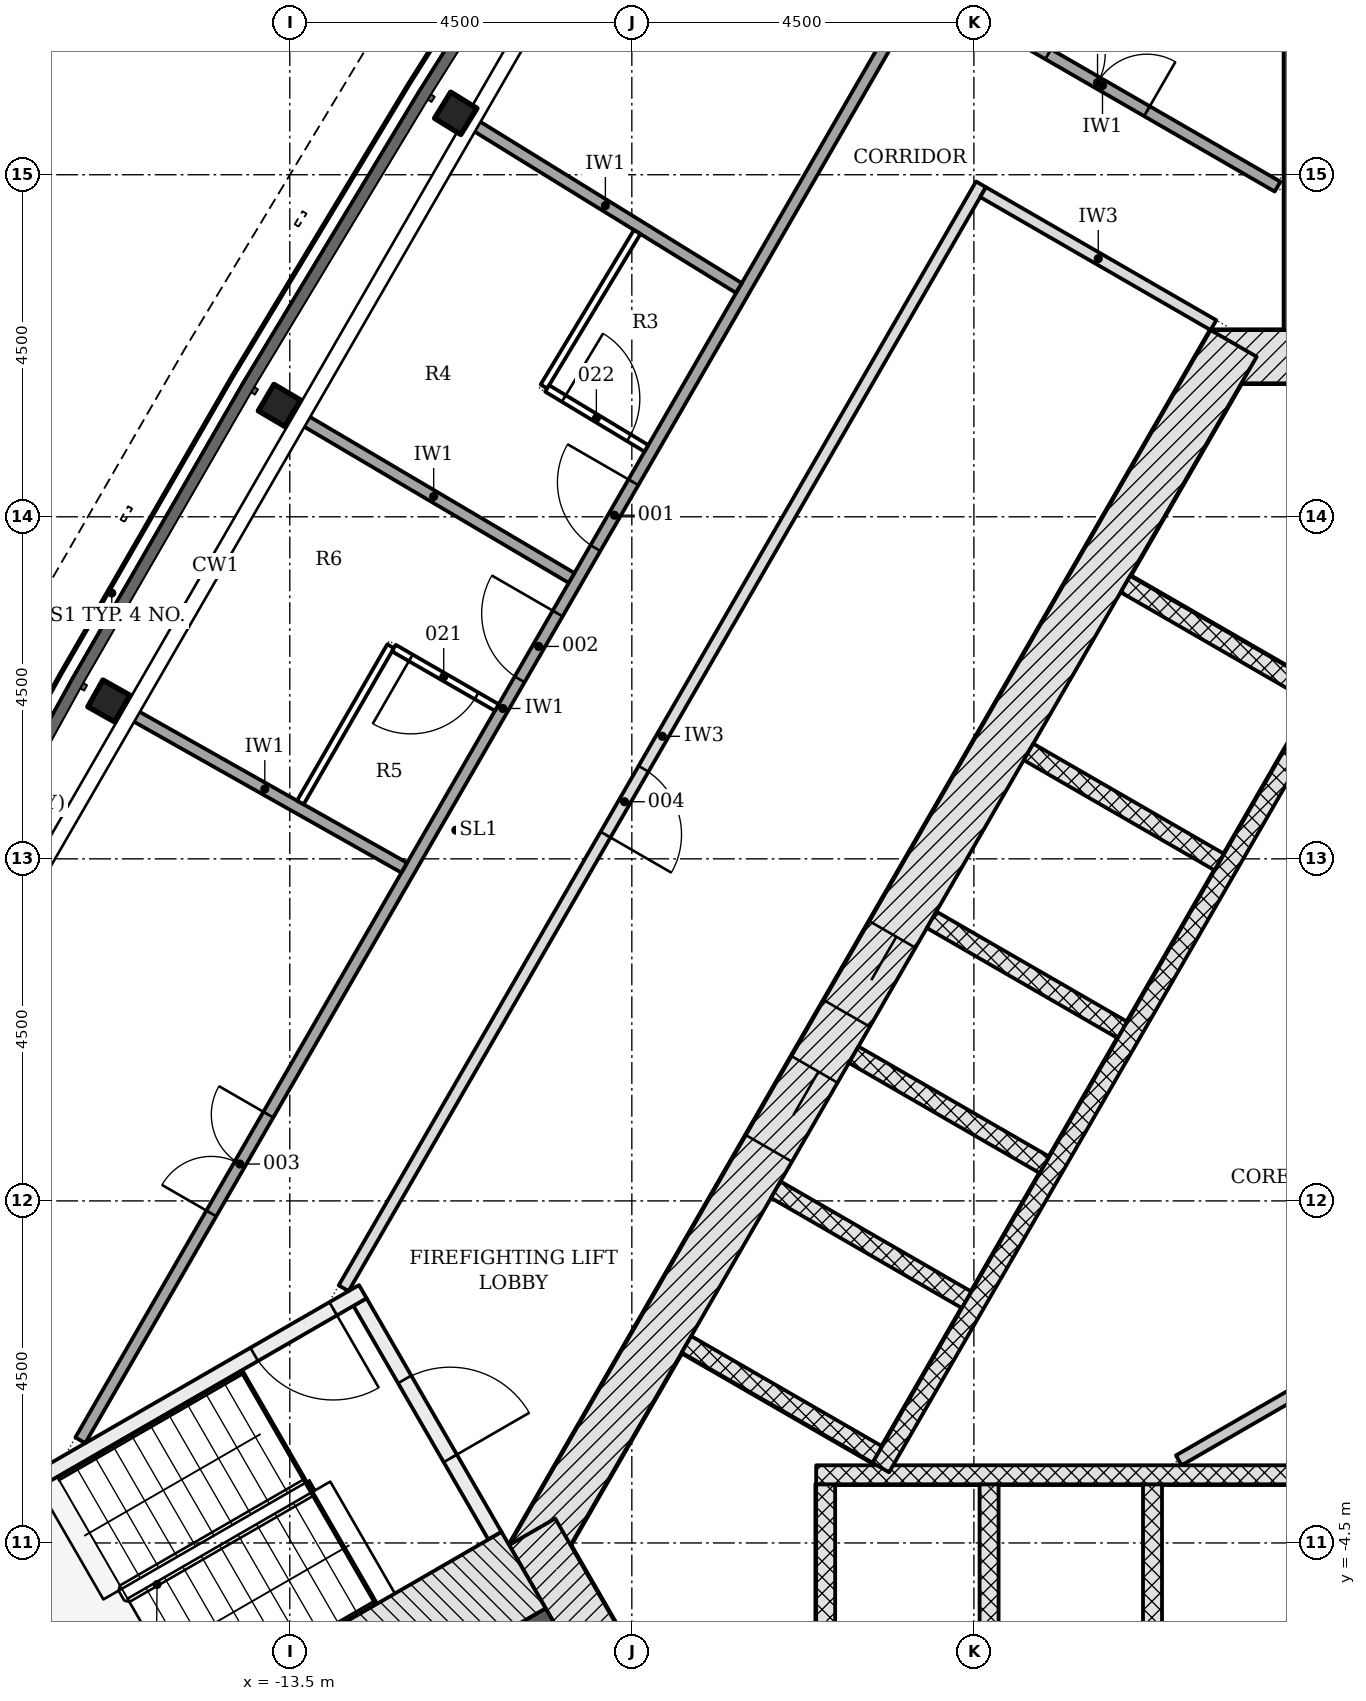
"""IFC4 building model, lengths in metres.
Left out: names, types, materials, properties, quantities, classifications, styles, units other than length and angle.
Written with IfcOpenShell. Run it as: python <this file> out.ifc"""

import sys

from ifc_helpers import new_model, si_unit, direction, frame, frame_2d, origin, origin_2d, place, context, subcontext, project, spatial, rectangle, i_section, extrude, element, fill, save


model = new_model("IFC4")
c1 = context("Model", 3, precision=1e-05, world=origin(), true_north=direction((0.0, 1.0)))
c2 = subcontext(c1, "Body", "Model", "MODEL_VIEW")
j1 = project(units=[si_unit("LENGTHUNIT", "METRE"), si_unit("PLANEANGLEUNIT", "RADIAN")], contexts=[c1])
p1 = place(None, origin())
s1 = spatial("IfcSite", under=j1, at=p1, CompositionType="ELEMENT")
p2 = place(p1, origin())
s2 = spatial("IfcBuilding", under=s1, at=p2, CompositionType="ELEMENT")
p3 = place(p2, frame((0.0, 0.0, 79.8)))
s3 = spatial("IfcBuildingStorey", under=s2, at=p3, CompositionType="ELEMENT", Elevation=79.8)
p4 = place(p3, frame((1.386, 11.106, -0.2), z_axis=(0.0, 0.0, 1.0), x_axis=(-1.0, 0.0, 0.0)))
e1 = element("IfcWall", 1, at=p4, inside=s3, PredefinedType="SHEAR", context=c2, shape_type="SweptSolid", body=[
    extrude(rectangle(XDim=2.771, YDim=0.7, at=frame_2d((1.386, 0.0))), origin(), (0.0, 0.0, 1.0), 3.6),
])
p5 = place(p3, frame((-1.083, 11.281, -0.2), z_axis=(0.0, 0.0, 1.0), x_axis=(-0.500001446645, -0.866024568562, 0.0)))
e2 = element("IfcWall", 2, at=p5, inside=s3, PredefinedType="SHEAR", context=c2, shape_type="SweptSolid", body=[
    extrude(rectangle(XDim=18.458, YDim=0.7, at=frame_2d((9.229, 0.0))), origin(), (0.0, 0.0, 1.0), 3.6),
])
p6 = place(p5, frame((8.979, 0.0, 0.2)))
e3 = element("IfcOpeningElement", 3, at=p6, cuts=e2, PredefinedType="OPENING", context=c2, shape_type="SweptSolid", body=[
    extrude(rectangle(XDim=1.2, YDim=2.1, at=frame_2d((0.6, 1.05))), frame((0.0, 0.36, 0.0), z_axis=(0.0, -1.0, 0.0), x_axis=(1.0, 0.0, 0.0)), (0.0, 0.0, 1.0), 0.72),
])
p7 = place(p5, frame((11.029, 0.0, 0.2)))
e4 = element("IfcOpeningElement", 4, at=p7, cuts=e2, PredefinedType="OPENING", context=c2, shape_type="SweptSolid", body=[
    extrude(rectangle(XDim=1.2, YDim=2.1, at=frame_2d((0.6, 1.05))), frame((0.0, 0.36, 0.0), z_axis=(0.0, -1.0, 0.0), x_axis=(1.0, 0.0, 0.0)), (0.0, 0.0, 1.0), 0.72),
])
p8 = place(p3, frame((-10.311, -4.353, -0.2), z_axis=(0.0, 0.0, 1.0), x_axis=(0.500042739161, -0.866000726912, 0.0)))
e5 = element("IfcWall", 5, at=p8, inside=s3, PredefinedType="SHEAR", context=c2, shape_type="SweptSolid", body=[
    extrude(rectangle(XDim=2.771, YDim=0.7, at=frame_2d((1.386, 0.0))), origin(), (0.0, 0.0, 1.0), 3.6),
])
p9 = place(p3, frame((0.0, 11.456, -0.2), z_axis=(0.0, 0.0, 1.0), x_axis=(0.0, 1.0, 0.0)))
e6 = element("IfcWall", 6, at=p9, inside=s3, PredefinedType="SHEAR", context=c2, shape_type="SweptSolid", body=[
    extrude(rectangle(XDim=13.065, YDim=0.85, at=frame_2d((6.532, 0.0))), origin(), (0.0, 0.0, 1.0), 3.6),
])
p10 = place(p3, frame((-9.922, -5.728, -0.2), z_axis=(0.0, 0.0, 1.0), x_axis=(-0.866026565165, -0.499997988424, 0.0)))
e7 = element("IfcWall", 7, at=p10, inside=s3, PredefinedType="SHEAR", context=c2, shape_type="SweptSolid", body=[
    extrude(rectangle(XDim=13.064, YDim=0.85, at=frame_2d((6.532, 0.0))), origin(), (0.0, 0.0, 1.0), 3.6),
])
for number, where, z_axis, x_axis in (
    (8, (-11.316, 14.308, -0.2), (0.0, 0.0, 1.0), (-0.525, -0.851, 0.0)),
    (9, (-13.636, 10.465, -0.2), (0.0, 0.0, 1.0), (-0.508, -0.861, 0.0)),
    (10, (-15.881, 6.577, -0.2), (0.0, 0.0, 1.0), (-0.492, -0.871, 0.0)),
):
    element("IfcColumn", number, at=place(p3, frame(where, z_axis=z_axis, x_axis=x_axis)), inside=s3, PredefinedType="COLUMN", context=c2, shape_type="SweptSolid", body=[
        extrude(i_section(OverallWidth=0.404, OverallDepth=0.406, WebThickness=0.027, FlangeThickness=0.044, FilletRadius=0.015, at=origin_2d()), origin(), (0.0, 0.0, 1.0), 3.6),
    ])
for number, where, z_axis, x_axis in (
    (11, (-6.45, -6.228, -0.2), (0.0, 0.0, 1.0), (0.0, 1.0, 0.0)),
    (12, (-4.3, -6.228, -0.2), (0.0, 0.0, 1.0), (0.0, 1.0, 0.0)),
    (13, (-2.15, -6.228, -0.2), (0.0, 0.0, 1.0), (0.0, 1.0, 0.0)),
):
    element("IfcWall", number, at=place(p3, frame(where, z_axis=z_axis, x_axis=x_axis)), inside=s3, PredefinedType="PARTITIONING", context=c2, shape_type="SweptSolid", body=[
        extrude(rectangle(XDim=2.5, YDim=0.25, at=frame_2d((1.25, 0.0))), origin(), (0.0, 0.0, 1.0), 3.6),
    ])
p11 = place(p3, frame((-6.575, -3.603, 0.0), z_axis=(0.0, 0.0, 1.0), x_axis=(1.0, 0.0, 0.0)))
e14 = element("IfcWall", 14, at=p11, inside=s3, PredefinedType="PARTITIONING", context=c2, shape_type="SweptSolid", body=[
    extrude(rectangle(XDim=13.15, YDim=0.25, at=frame_2d((6.575, 0.0))), origin(), (0.0, 0.0, 1.0), 3.4),
])
p12 = place(p3, frame((-2.506, 8.115, -0.2), z_axis=(0.0, 0.0, 1.0), x_axis=(0.865996321171, -0.50005036918, 0.0)))
e15 = element("IfcWall", 15, at=p12, inside=s3, PredefinedType="PARTITIONING", context=c2, shape_type="SweptSolid", body=[
    extrude(rectangle(XDim=2.9, YDim=0.25, at=frame_2d((1.45, 0.0))), origin(), (0.0, 0.0, 1.0), 3.6),
])
for number, where, z_axis, x_axis in (
    (16, (-3.781, 5.907, -0.2), (0.0, 0.0, 1.0), (0.866, -0.5, 0.0)),
    (17, (-5.056, 3.699, -0.2), (0.0, 0.0, 1.0), (0.866, -0.5, 0.0)),
    (18, (-6.081, 1.923, -0.2), (0.0, 0.0, 1.0), (0.866, -0.5, 0.0)),
    (19, (-7.106, 0.148, -0.2), (0.0, 0.0, 1.0), (0.866, -0.5, 0.0)),
    (20, (-8.281, -1.887, -0.2), (0.0, 0.0, 1.0), (0.866, -0.5, 0.0)),
):
    element("IfcWall", number, at=place(p3, frame(where, z_axis=z_axis, x_axis=x_axis)), inside=s3, PredefinedType="PARTITIONING", context=c2, shape_type="SweptSolid", body=[
        extrude(rectangle(XDim=2.9, YDim=0.25, at=frame_2d((1.45, 0.0))), origin(), (0.0, 0.0, 1.0), 3.6),
    ])
p13 = place(p3, frame((0.176, 6.711, 0.0), z_axis=(0.0, 0.0, 1.0), x_axis=(-0.500004227369, -0.866022963098, 0.0)))
e21 = element("IfcWall", 21, at=p13, inside=s3, PredefinedType="PARTITIONING", context=c2, shape_type="SweptSolid", body=[
    extrude(rectangle(XDim=11.8, YDim=0.25, at=frame_2d((5.9, 0.0))), origin(), (0.0, 0.0, 1.0), 3.4),
])
p14 = place(p3, frame((-1.804, -3.413, 0.0), z_axis=(0.0, 0.0, 1.0), x_axis=(0.866035761792, 0.499982058975, 0.0)))
e22 = element("IfcWall", 22, at=p14, inside=s3, PredefinedType="PARTITIONING", context=c2, shape_type="SweptSolid", body=[
    extrude(rectangle(XDim=9.497, YDim=0.15, at=frame_2d((4.749, 0.0))), origin(), (0.0, 0.0, 1.0), 3.4),
])
p15 = place(p14, frame((2.85, 0.0, 0.0)))
e23 = element("IfcOpeningElement", 23, at=p15, cuts=e22, PredefinedType="OPENING", context=c2, shape_type="SweptSolid", body=[
    extrude(rectangle(XDim=0.9, YDim=2.1, at=frame_2d((0.45, 1.05))), frame((0.0, 0.085, 0.0), z_axis=(0.0, -1.0, 0.0), x_axis=(1.0, 0.0, 0.0)), (0.0, 0.0, 1.0), 0.17),
])
p16 = place(p3, frame((-12.576, -1.331, -0.2), z_axis=(0.0, 0.0, 1.0), x_axis=(0.499970499736, -0.8660424351, 0.0)))
e24 = element("IfcWall", 24, at=p16, inside=s3, PredefinedType="SHEAR", context=c2, shape_type="SweptSolid", body=[
    extrude(rectangle(XDim=3.55, YDim=0.2, at=frame_2d((1.775, 0.0))), origin(), (0.0, 0.0, 1.0), 3.6),
])
p17 = place(p16, frame((1.175, 0.0, 0.2)))
e25 = element("IfcOpeningElement", 25, at=p17, cuts=e24, PredefinedType="OPENING", context=c2, shape_type="SweptSolid", body=[
    extrude(rectangle(XDim=1.2, YDim=2.1, at=frame_2d((0.6, 1.05))), frame((0.0, 0.11, 0.0), z_axis=(0.0, -1.0, 0.0), x_axis=(1.0, 0.0, 0.0)), (0.0, 0.0, 1.0), 0.22),
])
p18 = place(p3, frame((-12.539, -1.194, -0.2), z_axis=(0.0, 0.0, 1.0), x_axis=(-0.866045472092, -0.499965239061, 0.0)))
e26 = element("IfcWall", 26, at=p18, inside=s3, PredefinedType="SHEAR", context=c2, shape_type="SweptSolid", body=[
    extrude(rectangle(XDim=5.6, YDim=0.2, at=frame_2d((2.8, 0.0))), origin(), (0.0, 0.0, 1.0), 3.6),
])
p19 = place(p18, frame((0.45, 0.0, 0.2)))
e27 = element("IfcOpeningElement", 27, at=p19, cuts=e26, PredefinedType="OPENING", context=c2, shape_type="SweptSolid", body=[
    extrude(rectangle(XDim=1.2, YDim=2.1, at=frame_2d((0.6, 1.05))), frame((0.0, 0.11, 0.0), z_axis=(0.0, -1.0, 0.0), x_axis=(1.0, 0.0, 0.0)), (0.0, 0.0, 1.0), 0.22),
])
p20 = place(p3, frame((-10.424, -4.858, -0.2), z_axis=(0.0, 0.0, 1.0), x_axis=(-0.866033125095, -0.499986626058, 0.0)))
e28 = element("IfcWall", 28, at=p20, inside=s3, PredefinedType="SHEAR", context=c2, shape_type="SweptSolid", body=[
    extrude(rectangle(XDim=7.2, YDim=1.161, at=frame_2d((3.6, 0.0))), origin(), (0.0, 0.0, 1.0), 3.6),
])
p21 = place(p3, frame((-16.256, -3.149, 0.0), z_axis=(0.0, 0.0, 1.0), x_axis=(0.499999683919, 0.866025586274, 0.0)))
e29 = element("IfcWall", 29, at=p21, inside=s3, PredefinedType="PARTITIONING", context=c2, shape_type="SweptSolid", body=[
    extrude(rectangle(XDim=22.234, YDim=0.15, at=frame_2d((11.117, 0.0))), origin(), (0.0, 0.0, 1.0), 2.778),
])
p22 = place(p21, frame((13.553, 0.0, 0.0)))
e30 = element("IfcOpeningElement", 30, at=p22, cuts=e29, PredefinedType="OPENING", context=c2, shape_type="SweptSolid", body=[
    extrude(rectangle(XDim=1.0, YDim=2.1, at=frame_2d((0.5, 1.05))), frame((0.0, 0.085, 0.0), z_axis=(0.0, -1.0, 0.0), x_axis=(1.0, 0.0, 0.0)), (0.0, 0.0, 1.0), 0.17),
])
p23 = place(p21, frame((11.56, 0.0, 0.0)))
e31 = element("IfcOpeningElement", 31, at=p23, cuts=e29, PredefinedType="OPENING", context=c2, shape_type="SweptSolid", body=[
    extrude(rectangle(XDim=1.0, YDim=2.1, at=frame_2d((0.5, 1.05))), frame((0.0, 0.085, 0.0), z_axis=(0.0, -1.0, 0.0), x_axis=(1.0, 0.0, 0.0)), (0.0, 0.0, 1.0), 0.17),
])
p24 = place(p21, frame((3.446, 0.0, 0.0)))
e32 = element("IfcOpeningElement", 32, at=p24, cuts=e29, PredefinedType="OPENING", context=c2, shape_type="SweptSolid", body=[
    extrude(rectangle(XDim=1.5, YDim=2.1, at=frame_2d((0.75, 1.05))), frame((0.0, 0.085, 0.0), z_axis=(0.0, -1.0, 0.0), x_axis=(1.0, 0.0, 0.0)), (0.0, 0.0, 1.0), 0.17),
])
p25 = place(p3, frame((-4.407, 13.374, 0.0), z_axis=(0.0, 0.0, 1.0), x_axis=(-0.499997181693, -0.866027030928, 0.0)))
e33 = element("IfcWall", 33, at=p25, inside=s3, PredefinedType="PARTITIONING", context=c2, shape_type="SweptSolid", body=[
    extrude(rectangle(XDim=16.77, YDim=0.15, at=frame_2d((8.385, 0.0))), origin(), (0.0, 0.0, 1.0), 2.778),
])
p26 = place(p25, frame((8.879, 0.0, 0.0)))
e34 = element("IfcOpeningElement", 34, at=p26, cuts=e33, PredefinedType="OPENING", context=c2, shape_type="SweptSolid", body=[
    extrude(rectangle(XDim=1.0, YDim=2.1, at=frame_2d((0.5, 1.05))), frame((0.0, 0.085, 0.0), z_axis=(0.0, -1.0, 0.0), x_axis=(1.0, 0.0, 0.0)), (0.0, 0.0, 1.0), 0.17),
])
p27 = place(p3, frame((-5.111, 16.003, 0.0), z_axis=(0.0, 0.0, 1.0), x_axis=(0.866034245675, -0.499984685083, 0.0)))
e35 = element("IfcWall", 35, at=p27, inside=s3, PredefinedType="PARTITIONING", context=c2, shape_type="SweptSolid", body=[
    extrude(rectangle(XDim=5.319, YDim=0.15, at=frame_2d((2.66, 0.0))), origin(), (0.0, 0.0, 1.0), 3.4),
])
p28 = place(p27, frame((1.834, 0.0, 0.0)))
e36 = element("IfcOpeningElement", 36, at=p28, cuts=e35, PredefinedType="OPENING", context=c2, shape_type="SweptSolid", body=[
    extrude(rectangle(XDim=1.5, YDim=2.1, at=frame_2d((0.75, 1.05))), frame((0.0, 0.085, 0.0), z_axis=(0.0, -1.0, 0.0), x_axis=(1.0, 0.0, 0.0)), (0.0, 0.0, 1.0), 0.17),
])
p29 = place(p3, frame((-4.379, 13.271, 0.0), z_axis=(0.0, 0.0, 1.0), x_axis=(0.866019471182, -0.500010275428, 0.0)))
e37 = element("IfcWall", 37, at=p29, inside=s3, PredefinedType="PARTITIONING", context=c2, shape_type="SweptSolid", body=[
    extrude(rectangle(XDim=3.5, YDim=0.15, at=frame_2d((1.75, 0.0))), origin(), (0.0, 0.0, 1.0), 3.4),
])
p30 = place(p3, frame((-15.663, 6.454, 0.0), z_axis=(0.0, 0.0, 1.0), x_axis=(0.870876717705, -0.491501518369, 0.0)))
e38 = element("IfcWall", 38, at=p30, inside=s3, PredefinedType="PARTITIONING", context=c2, shape_type="SweptSolid", body=[
    extrude(rectangle(XDim=4.213, YDim=0.15, at=frame_2d((2.106, 0.0))), origin(), (0.0, 0.0, 1.0), 2.778),
])
p31 = place(p3, frame((-13.421, 10.338, 0.0), z_axis=(0.0, 0.0, 1.0), x_axis=(0.861127198417, -0.508389563372, 0.0)))
e39 = element("IfcWall", 39, at=p31, inside=s3, PredefinedType="PARTITIONING", context=c2, shape_type="SweptSolid", body=[
    extrude(rectangle(XDim=4.213, YDim=0.15, at=frame_2d((2.106, 0.0))), origin(), (0.0, 0.0, 1.0), 2.778),
])
p32 = place(p3, frame((-11.104, 14.177, 0.0), z_axis=(0.0, 0.0, 1.0), x_axis=(0.851052327985, -0.525080884276, 0.0)))
e40 = element("IfcWall", 40, at=p32, inside=s3, PredefinedType="PARTITIONING", context=c2, shape_type="SweptSolid", body=[
    extrude(rectangle(XDim=4.126, YDim=0.15, at=frame_2d((2.063, 0.0))), origin(), (0.0, 0.0, 1.0), 2.778),
])
p33 = place(p3, frame((-8.93, 12.747, 0.0), z_axis=(0.0, 0.0, 1.0), x_axis=(-0.516762446906, -0.856128829948, 0.0)))
e41 = element("IfcWall", 41, at=p33, inside=s3, PredefinedType="PARTITIONING", context=c2, shape_type="SweptSolid", body=[
    extrude(rectangle(XDim=2.374, YDim=0.1, at=frame_2d((1.187, 0.0))), origin(), (0.0, 0.0, 1.0), 2.778),
])
p34 = place(p3, frame((-13.361, 5.241, 0.0), z_axis=(0.0, 0.0, 1.0), x_axis=(0.499965759324, 0.866045171745, 0.0)))
e42 = element("IfcWall", 42, at=p34, inside=s3, PredefinedType="PARTITIONING", context=c2, shape_type="SweptSolid", body=[
    extrude(rectangle(XDim=2.374, YDim=0.1, at=frame_2d((1.187, 0.0))), origin(), (0.0, 0.0, 1.0), 2.778),
])
p35 = place(p3, frame((-10.777, 6.491, 0.0), z_axis=(0.0, 0.0, 1.0), x_axis=(-0.865995788838, 0.500051291085, 0.0)))
e43 = element("IfcWall", 43, at=p35, inside=s3, PredefinedType="PARTITIONING", context=c2, shape_type="SweptSolid", body=[
    extrude(rectangle(XDim=1.564, YDim=0.1, at=frame_2d((0.782, 0.0))), origin(), (0.0, 0.0, 1.0), 3.4),
])
p36 = place(p35, frame((0.307, 0.0, 0.0)))
e44 = element("IfcOpeningElement", 44, at=p36, cuts=e43, PredefinedType="OPENING", context=c2, shape_type="SweptSolid", body=[
    extrude(rectangle(XDim=1.0, YDim=2.1, at=frame_2d((0.5, 1.05))), frame((0.0, 0.06, 0.0), z_axis=(0.0, -1.0, 0.0), x_axis=(1.0, 0.0, 0.0)), (0.0, 0.0, 1.0), 0.12),
])
p37 = place(p3, frame((-10.114, 10.688, 0.0), z_axis=(0.0, 0.0, 1.0), x_axis=(0.856147343639, -0.516731773728, 0.0)))
e45 = element("IfcWall", 45, at=p37, inside=s3, PredefinedType="PARTITIONING", context=c2, shape_type="SweptSolid", body=[
    extrude(rectangle(XDim=1.524, YDim=0.1, at=frame_2d((0.762, 0.0))), origin(), (0.0, 0.0, 1.0), 3.4),
])
p38 = place(p37, frame((0.256, 0.0, 0.0)))
e46 = element("IfcOpeningElement", 46, at=p38, cuts=e45, PredefinedType="OPENING", context=c2, shape_type="SweptSolid", body=[
    extrude(rectangle(XDim=1.0, YDim=2.1, at=frame_2d((0.5, 1.05))), frame((0.0, 0.06, 0.0), z_axis=(0.0, -1.0, 0.0), x_axis=(1.0, 0.0, 0.0)), (0.0, 0.0, 1.0), 0.12),
])
p39 = place(p6, origin())
e47 = element("IfcDoor", 47, at=p39, inside=s3, OperationType="DOUBLE_DOOR_SLIDING", PredefinedType="DOOR", context=c2, shape_type="SweptSolid", body=[
    extrude(rectangle(XDim=1.2, YDim=2.1, at=frame_2d((0.6, 1.05))), frame((0.0, 0.025, 0.0), z_axis=(0.0, -1.0, 0.0), x_axis=(1.0, 0.0, 0.0)), (0.0, 0.0, 1.0), 0.05),
])
fill(e3, e47)
p40 = place(p7, origin())
e48 = element("IfcDoor", 48, at=p40, inside=s3, OperationType="DOUBLE_DOOR_SLIDING", PredefinedType="DOOR", context=c2, shape_type="SweptSolid", body=[
    extrude(rectangle(XDim=1.2, YDim=2.1, at=frame_2d((0.6, 1.05))), frame((0.0, 0.025, 0.0), z_axis=(0.0, -1.0, 0.0), x_axis=(1.0, 0.0, 0.0)), (0.0, 0.0, 1.0), 0.05),
])
fill(e4, e48)
p41 = place(p17, origin())
e49 = element("IfcDoor", 49, at=p41, inside=s3, OperationType="SINGLE_SWING_RIGHT", PredefinedType="DOOR", context=c2, shape_type="SweptSolid", body=[
    extrude(rectangle(XDim=1.2, YDim=2.1, at=frame_2d((0.6, 1.05))), frame((0.0, 0.025, 0.0), z_axis=(0.0, -1.0, 0.0), x_axis=(1.0, 0.0, 0.0)), (0.0, 0.0, 1.0), 0.05),
])
fill(e25, e49)
p42 = place(p19, origin())
e50 = element("IfcDoor", 50, at=p42, inside=s3, OperationType="SINGLE_SWING_LEFT", PredefinedType="DOOR", context=c2, shape_type="SweptSolid", body=[
    extrude(rectangle(XDim=1.2, YDim=2.1, at=frame_2d((0.6, 1.05))), frame((0.0, 0.025, 0.0), z_axis=(0.0, -1.0, 0.0), x_axis=(1.0, 0.0, 0.0)), (0.0, 0.0, 1.0), 0.05),
])
fill(e27, e50)
p43 = place(p22, origin())
e51 = element("IfcDoor", 51, at=p43, inside=s3, OperationType="SINGLE_SWING_RIGHT", PredefinedType="DOOR", context=c2, shape_type="SweptSolid", body=[
    extrude(rectangle(XDim=1.0, YDim=2.1, at=frame_2d((0.5, 1.05))), frame((0.0, 0.025, 0.0), z_axis=(0.0, -1.0, 0.0), x_axis=(1.0, 0.0, 0.0)), (0.0, 0.0, 1.0), 0.05),
])
fill(e30, e51)
p44 = place(p23, origin())
e52 = element("IfcDoor", 52, at=p44, inside=s3, OperationType="SINGLE_SWING_RIGHT", PredefinedType="DOOR", context=c2, shape_type="SweptSolid", body=[
    extrude(rectangle(XDim=1.0, YDim=2.1, at=frame_2d((0.5, 1.05))), frame((0.0, 0.025, 0.0), z_axis=(0.0, -1.0, 0.0), x_axis=(1.0, 0.0, 0.0)), (0.0, 0.0, 1.0), 0.05),
])
fill(e31, e52)
p45 = place(p24, origin())
e53 = element("IfcDoor", 53, at=p45, inside=s3, OperationType="DOUBLE_DOOR_SINGLE_SWING", PredefinedType="DOOR", context=c2, shape_type="SweptSolid", body=[
    extrude(rectangle(XDim=1.5, YDim=2.1, at=frame_2d((0.75, 1.05))), frame((0.0, 0.025, 0.0), z_axis=(0.0, -1.0, 0.0), x_axis=(1.0, 0.0, 0.0)), (0.0, 0.0, 1.0), 0.05),
])
fill(e32, e53)
p46 = place(p26, origin())
e54 = element("IfcDoor", 54, at=p46, inside=s3, OperationType="SINGLE_SWING_RIGHT", PredefinedType="DOOR", context=c2, shape_type="SweptSolid", body=[
    extrude(rectangle(XDim=1.0, YDim=2.1, at=frame_2d((0.5, 1.05))), frame((0.0, 0.025, 0.0), z_axis=(0.0, -1.0, 0.0), x_axis=(1.0, 0.0, 0.0)), (0.0, 0.0, 1.0), 0.05),
])
fill(e34, e54)
p47 = place(p28, origin())
e55 = element("IfcDoor", 55, at=p47, inside=s3, OperationType="DOUBLE_DOOR_SINGLE_SWING", PredefinedType="DOOR", context=c2, shape_type="SweptSolid", body=[
    extrude(rectangle(XDim=1.5, YDim=2.1, at=frame_2d((0.75, 1.05))), frame((0.0, 0.025, 0.0), z_axis=(0.0, -1.0, 0.0), x_axis=(1.0, 0.0, 0.0)), (0.0, 0.0, 1.0), 0.05),
])
fill(e36, e55)
p48 = place(p36, origin())
e56 = element("IfcDoor", 56, at=p48, inside=s3, OperationType="SINGLE_SWING_RIGHT", PredefinedType="DOOR", context=c2, shape_type="SweptSolid", body=[
    extrude(rectangle(XDim=1.0, YDim=2.1, at=frame_2d((0.5, 1.05))), frame((0.0, 0.025, 0.0), z_axis=(0.0, -1.0, 0.0), x_axis=(1.0, 0.0, 0.0)), (0.0, 0.0, 1.0), 0.05),
])
fill(e44, e56)
p49 = place(p38, origin())
e57 = element("IfcDoor", 57, at=p49, inside=s3, OperationType="SINGLE_SWING_LEFT", PredefinedType="DOOR", context=c2, shape_type="SweptSolid", body=[
    extrude(rectangle(XDim=1.0, YDim=2.1, at=frame_2d((0.5, 1.05))), frame((0.0, 0.025, 0.0), z_axis=(0.0, -1.0, 0.0), x_axis=(1.0, 0.0, 0.0)), (0.0, 0.0, 1.0), 0.05),
])
fill(e46, e57)
save(model, sys.argv[1])
